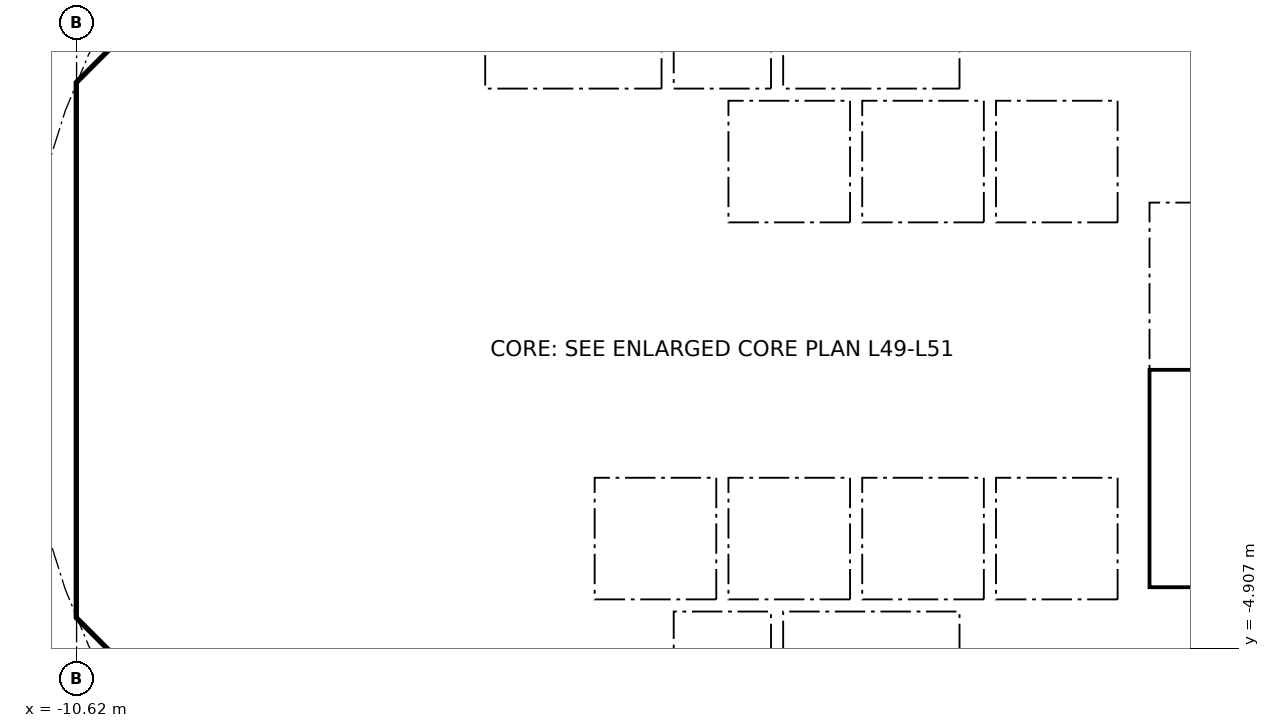
"""IFC4 building model, lengths in metres.
Left out: names, types, materials, properties, quantities, classifications, styles, units other than length and angle.
Written with IfcOpenShell. Run it as: python <this file> out.ifc"""

import sys

from ifc_helpers import new_model, si_unit, direction, frame, frame_2d, origin, place, context, subcontext, project, spatial, polyline, rectangle, outline, extrude, element, fill, save


model = new_model("IFC4")
c1 = context("Model", 3, precision=1e-05, world=origin(), true_north=direction((0.0, 1.0)))
c2 = subcontext(c1, "Body", "Model", "MODEL_VIEW")
j1 = project(units=[si_unit("LENGTHUNIT", "METRE"), si_unit("PLANEANGLEUNIT", "RADIAN")], contexts=[c1])
p1 = place(None, origin())
s1 = spatial("IfcSite", under=j1, at=p1, CompositionType="ELEMENT")
p2 = place(p1, origin())
s2 = spatial("IfcBuilding", under=s1, at=p2, CompositionType="ELEMENT")
p3 = place(p2, frame((0.0, 0.0, 195.5)))
s3 = spatial("IfcBuildingStorey", under=s2, at=p3, CompositionType="ELEMENT", Elevation=195.5)
p4 = place(p3, frame((9.988, 4.613, 0.0), z_axis=(0.0, 0.0, 1.0), x_axis=(-0.707106781187, 0.707106781187, 0.0)))
e1 = element("IfcWall", 1, at=p4, inside=s3, PredefinedType="SHEAR", context=c2, shape_type="SweptSolid", body=[
    extrude(rectangle(XDim=7.602, YDim=0.6, at=frame_2d((3.801, 0.0))), origin(), (0.0, 0.0, 1.0), 3.44),
])
p5 = place(p4, frame((3.201, 0.0, 0.0)))
e2 = element("IfcOpeningElement", 2, at=p5, cuts=e1, PredefinedType="OPENING", context=c2, shape_type="SweptSolid", body=[
    extrude(rectangle(XDim=1.2, YDim=2.1, at=frame_2d((0.6, 1.05))), frame((0.0, 0.31, 0.0), z_axis=(0.0, -1.0, 0.0), x_axis=(1.0, 0.0, 0.0)), (0.0, 0.0, 1.0), 0.62),
])
p6 = place(p3, frame((-4.613, 9.988, 0.0), z_axis=(0.0, 0.0, 1.0), x_axis=(-0.707106781187, -0.707106781187, 0.0)))
e3 = element("IfcWall", 3, at=p6, inside=s3, PredefinedType="SHEAR", context=c2, shape_type="SweptSolid", body=[
    extrude(rectangle(XDim=7.602, YDim=0.6, at=frame_2d((3.801, 0.0))), origin(), (0.0, 0.0, 1.0), 3.44),
])
p7 = place(p6, frame((0.351, 0.0, 0.0)))
e4 = element("IfcOpeningElement", 4, at=p7, cuts=e3, PredefinedType="OPENING", context=c2, shape_type="SweptSolid", body=[
    extrude(rectangle(XDim=1.1, YDim=2.1, at=frame_2d((0.55, 1.05))), frame((0.0, 0.31, 0.0), z_axis=(0.0, -1.0, 0.0), x_axis=(1.0, 0.0, 0.0)), (0.0, 0.0, 1.0), 0.62),
])
p8 = place(p3, frame((-10.325, 3.801, 0.0), z_axis=(0.0, 0.0, 1.0), x_axis=(0.0, -1.0, 0.0)))
e5 = element("IfcWall", 5, at=p8, inside=s3, PredefinedType="SHEAR", context=c2, shape_type="SweptSolid", body=[
    extrude(rectangle(XDim=7.602, YDim=0.6, at=frame_2d((3.801, 0.0))), origin(), (0.0, 0.0, 1.0), 3.44),
])
p9 = place(p8, frame((0.651, 0.0, 0.0)))
e6 = element("IfcOpeningElement", 6, at=p9, cuts=e5, PredefinedType="OPENING", context=c2, shape_type="SweptSolid", body=[
    extrude(rectangle(XDim=1.5, YDim=2.1, at=frame_2d((0.75, 1.05))), frame((0.0, 0.31, 0.0), z_axis=(0.0, -1.0, 0.0), x_axis=(1.0, 0.0, 0.0)), (0.0, 0.0, 1.0), 0.62),
])
p10 = place(p8, frame((5.451, 0.0, 0.0)))
e7 = element("IfcOpeningElement", 7, at=p10, cuts=e5, PredefinedType="OPENING", context=c2, shape_type="SweptSolid", body=[
    extrude(rectangle(XDim=1.5, YDim=2.1, at=frame_2d((0.75, 1.05))), frame((0.0, 0.31, 0.0), z_axis=(0.0, -1.0, 0.0), x_axis=(1.0, 0.0, 0.0)), (0.0, 0.0, 1.0), 0.62),
])
p11 = place(p3, frame((-9.988, -4.613, 0.0), z_axis=(0.0, 0.0, 1.0), x_axis=(0.707106781187, -0.707106781187, 0.0)))
e8 = element("IfcWall", 8, at=p11, inside=s3, PredefinedType="SHEAR", context=c2, shape_type="SweptSolid", body=[
    extrude(rectangle(XDim=7.602, YDim=0.6, at=frame_2d((3.801, 0.0))), origin(), (0.0, 0.0, 1.0), 3.44),
])
p12 = place(p11, frame((6.151, 0.0, 0.0)))
e9 = element("IfcOpeningElement", 9, at=p12, cuts=e8, PredefinedType="OPENING", context=c2, shape_type="SweptSolid", body=[
    extrude(rectangle(XDim=1.1, YDim=2.1, at=frame_2d((0.55, 1.05))), frame((0.0, 0.31, 0.0), z_axis=(0.0, -1.0, 0.0), x_axis=(1.0, 0.0, 0.0)), (0.0, 0.0, 1.0), 0.62),
])
p13 = place(p3, frame((4.613, -9.988, 0.0), z_axis=(0.0, 0.0, 1.0), x_axis=(0.707106781187, 0.707106781187, 0.0)))
e10 = element("IfcWall", 10, at=p13, inside=s3, PredefinedType="SHEAR", context=c2, shape_type="SweptSolid", body=[
    extrude(rectangle(XDim=7.602, YDim=0.6, at=frame_2d((3.801, 0.0))), origin(), (0.0, 0.0, 1.0), 3.44),
])
p14 = place(p13, frame((3.201, 0.0, 0.0)))
e11 = element("IfcOpeningElement", 11, at=p14, cuts=e10, PredefinedType="OPENING", context=c2, shape_type="SweptSolid", body=[
    extrude(rectangle(XDim=1.2, YDim=2.1, at=frame_2d((0.6, 1.05))), frame((0.0, 0.31, 0.0), z_axis=(0.0, -1.0, 0.0), x_axis=(1.0, 0.0, 0.0)), (0.0, 0.0, 1.0), 0.62),
])
p15 = place(p3, frame((-5.8, 4.3, 0.0), z_axis=(0.0, 0.0, 1.0), x_axis=(0.0, 1.0, 0.0)))
e12 = element("IfcWall", 12, at=p15, inside=s3, PredefinedType="PARTITIONING", context=c2, shape_type="SweptSolid", body=[
    extrude(rectangle(XDim=3.927, YDim=0.15, at=frame_2d((1.963, 0.0))), origin(), (0.0, 0.0, 1.0), 3.44),
])
p16 = place(p15, frame((1.551, 0.0, 0.0)))
e13 = element("IfcOpeningElement", 13, at=p16, cuts=e12, PredefinedType="OPENING", context=c2, shape_type="SweptSolid", body=[
    extrude(rectangle(XDim=0.9, YDim=2.1, at=frame_2d((0.45, 1.05))), frame((0.0, 0.085, 0.0), z_axis=(0.0, -1.0, 0.0), x_axis=(1.0, 0.0, 0.0)), (0.0, 0.0, 1.0), 0.17),
])
p17 = place(p3, frame((4.0, 4.3, 0.0), z_axis=(0.0, 0.0, 1.0), x_axis=(0.0, 1.0, 0.0)))
e14 = element("IfcWall", 14, at=p17, inside=s3, PredefinedType="SOLIDWALL", context=c2, shape_type="SweptSolid", body=[
    extrude(rectangle(XDim=2.2, YDim=0.2, at=frame_2d((1.1, 0.0))), origin(), (0.0, 0.0, 1.0), 3.44),
])
p18 = place(p17, frame((0.55, 0.0, 0.0)))
e15 = element("IfcOpeningElement", 15, at=p18, cuts=e14, PredefinedType="OPENING", context=c2, shape_type="SweptSolid", body=[
    extrude(rectangle(XDim=1.1, YDim=2.1, at=frame_2d((0.55, 1.05))), frame((0.0, 0.11, 0.0), z_axis=(0.0, -1.0, 0.0), x_axis=(1.0, 0.0, 0.0)), (0.0, 0.0, 1.0), 0.22),
])
p19 = place(p3, frame((-4.0, 4.3, 0.0), z_axis=(0.0, 0.0, 1.0), x_axis=(0.0, 1.0, 0.0)))
e16 = element("IfcWall", 16, at=p19, inside=s3, PredefinedType="SOLIDWALL", context=c2, shape_type="SweptSolid", body=[
    extrude(rectangle(XDim=2.2, YDim=0.2, at=frame_2d((1.1, 0.0))), origin(), (0.0, 0.0, 1.0), 3.44),
])
p20 = place(p19, frame((0.55, 0.0, 0.0)))
e17 = element("IfcOpeningElement", 17, at=p20, cuts=e16, PredefinedType="OPENING", context=c2, shape_type="SweptSolid", body=[
    extrude(rectangle(XDim=1.1, YDim=2.1, at=frame_2d((0.55, 1.05))), frame((0.0, 0.11, 0.0), z_axis=(0.0, -1.0, 0.0), x_axis=(1.0, 0.0, 0.0)), (0.0, 0.0, 1.0), 0.22),
])
p21 = place(p3, frame((-6.7, 2.0, 0.0), z_axis=(0.0, 0.0, 1.0), x_axis=(1.0, 0.0, 0.0)))
e18 = element("IfcWall", 18, at=p21, inside=s3, PredefinedType="SOLIDWALL", context=c2, shape_type="SweptSolid", body=[
    extrude(rectangle(XDim=13.4, YDim=0.2, at=frame_2d((6.7, 0.0))), origin(), (0.0, 0.0, 1.0), 3.44),
])
p22 = place(p21, frame((7.25, 0.0, 0.0)))
e19 = element("IfcOpeningElement", 19, at=p22, cuts=e18, PredefinedType="OPENING", context=c2, shape_type="SweptSolid", body=[
    extrude(rectangle(XDim=1.1, YDim=2.1, at=frame_2d((0.55, 1.05))), frame((0.0, 0.11, 0.0), z_axis=(0.0, -1.0, 0.0), x_axis=(1.0, 0.0, 0.0)), (0.0, 0.0, 1.0), 0.22),
])
p23 = place(p21, frame((9.45, 0.0, 0.0)))
e20 = element("IfcOpeningElement", 20, at=p23, cuts=e18, PredefinedType="OPENING", context=c2, shape_type="SweptSolid", body=[
    extrude(rectangle(XDim=1.1, YDim=2.1, at=frame_2d((0.55, 1.05))), frame((0.0, 0.11, 0.0), z_axis=(0.0, -1.0, 0.0), x_axis=(1.0, 0.0, 0.0)), (0.0, 0.0, 1.0), 0.22),
])
p24 = place(p21, frame((2.95, 0.0, 0.0)))
e21 = element("IfcOpeningElement", 21, at=p24, cuts=e18, PredefinedType="OPENING", context=c2, shape_type="SweptSolid", body=[
    extrude(rectangle(XDim=0.9, YDim=2.1, at=frame_2d((0.45, 1.05))), frame((0.0, 0.11, 0.0), z_axis=(0.0, -1.0, 0.0), x_axis=(1.0, 0.0, 0.0)), (0.0, 0.0, 1.0), 0.22),
])
p25 = place(p3, frame((6.7, 4.0, 0.0), z_axis=(0.0, 0.0, 1.0), x_axis=(1.0, 0.0, 0.0)))
e22 = element("IfcWall", 22, at=p25, inside=s3, PredefinedType="SOLIDWALL", context=c2, shape_type="SweptSolid", body=[
    extrude(rectangle(XDim=3.325, YDim=0.2, at=frame_2d((1.662, 0.0))), origin(), (0.0, 0.0, 1.0), 3.44),
])
p26 = place(p25, frame((1.25, 0.0, 0.0)))
e23 = element("IfcOpeningElement", 23, at=p26, cuts=e22, PredefinedType="OPENING", context=c2, shape_type="SweptSolid", body=[
    extrude(rectangle(XDim=1.1, YDim=2.1, at=frame_2d((0.55, 1.05))), frame((0.0, 0.11, 0.0), z_axis=(0.0, -1.0, 0.0), x_axis=(1.0, 0.0, 0.0)), (0.0, 0.0, 1.0), 0.22),
])
p27 = place(p3, frame((-6.2, -7.827, 0.0), z_axis=(0.0, 0.0, 1.0), x_axis=(0.0, 1.0, 0.0)))
e24 = element("IfcWall", 24, at=p27, inside=s3, PredefinedType="PARTITIONING", context=c2, shape_type="SweptSolid", body=[
    extrude(rectangle(XDim=3.527, YDim=0.15, at=frame_2d((1.763, 0.0))), origin(), (0.0, 0.0, 1.0), 3.44),
])
p28 = place(p27, frame((2.365, 0.0, 0.0)))
e25 = element("IfcOpeningElement", 25, at=p28, cuts=e24, PredefinedType="OPENING", context=c2, shape_type="SweptSolid", body=[
    extrude(rectangle(XDim=0.9, YDim=2.1, at=frame_2d((0.45, 1.05))), frame((0.0, 0.085, 0.0), z_axis=(0.0, -1.0, 0.0), x_axis=(1.0, 0.0, 0.0)), (0.0, 0.0, 1.0), 0.17),
])
p29 = place(p27, frame((0.489, 0.0, 0.0)))
e26 = element("IfcOpeningElement", 26, at=p29, cuts=e24, PredefinedType="OPENING", context=c2, shape_type="SweptSolid", body=[
    extrude(rectangle(XDim=0.9, YDim=2.1, at=frame_2d((0.45, 1.05))), frame((0.0, 0.085, 0.0), z_axis=(0.0, -1.0, 0.0), x_axis=(1.0, 0.0, 0.0)), (0.0, 0.0, 1.0), 0.17),
])
p30 = place(p3, frame((4.0, -6.5, 0.0), z_axis=(0.0, 0.0, 1.0), x_axis=(0.0, 1.0, 0.0)))
e27 = element("IfcWall", 27, at=p30, inside=s3, PredefinedType="SOLIDWALL", context=c2, shape_type="SweptSolid", body=[
    extrude(rectangle(XDim=2.2, YDim=0.2, at=frame_2d((1.1, 0.0))), origin(), (0.0, 0.0, 1.0), 3.44),
])
p31 = place(p30, frame((0.55, 0.0, 0.0)))
e28 = element("IfcOpeningElement", 28, at=p31, cuts=e27, PredefinedType="OPENING", context=c2, shape_type="SweptSolid", body=[
    extrude(rectangle(XDim=1.1, YDim=2.1, at=frame_2d((0.55, 1.05))), frame((0.0, 0.11, 0.0), z_axis=(0.0, -1.0, 0.0), x_axis=(1.0, 0.0, 0.0)), (0.0, 0.0, 1.0), 0.22),
])
p32 = place(p3, frame((-4.0, -6.5, 0.0), z_axis=(0.0, 0.0, 1.0), x_axis=(0.0, 1.0, 0.0)))
e29 = element("IfcWall", 29, at=p32, inside=s3, PredefinedType="SOLIDWALL", context=c2, shape_type="SweptSolid", body=[
    extrude(rectangle(XDim=2.2, YDim=0.2, at=frame_2d((1.1, 0.0))), origin(), (0.0, 0.0, 1.0), 3.44),
])
p33 = place(p32, frame((0.65, 0.0, 0.0)))
e30 = element("IfcOpeningElement", 30, at=p33, cuts=e29, PredefinedType="OPENING", context=c2, shape_type="SweptSolid", body=[
    extrude(rectangle(XDim=0.9, YDim=2.1, at=frame_2d((0.45, 1.05))), frame((0.0, 0.11, 0.0), z_axis=(0.0, -1.0, 0.0), x_axis=(1.0, 0.0, 0.0)), (0.0, 0.0, 1.0), 0.22),
])
p34 = place(p3, frame((-6.7, -2.0, 0.0), z_axis=(0.0, 0.0, 1.0), x_axis=(1.0, 0.0, 0.0)))
e31 = element("IfcWall", 31, at=p34, inside=s3, PredefinedType="SOLIDWALL", context=c2, shape_type="SweptSolid", body=[
    extrude(rectangle(XDim=13.4, YDim=0.2, at=frame_2d((6.7, 0.0))), origin(), (0.0, 0.0, 1.0), 3.44),
])
p35 = place(p34, frame((5.05, 0.0, 0.0)))
e32 = element("IfcOpeningElement", 32, at=p35, cuts=e31, PredefinedType="OPENING", context=c2, shape_type="SweptSolid", body=[
    extrude(rectangle(XDim=1.1, YDim=2.1, at=frame_2d((0.55, 1.05))), frame((0.0, 0.11, 0.0), z_axis=(0.0, -1.0, 0.0), x_axis=(1.0, 0.0, 0.0)), (0.0, 0.0, 1.0), 0.22),
])
p36 = place(p34, frame((7.25, 0.0, 0.0)))
e33 = element("IfcOpeningElement", 33, at=p36, cuts=e31, PredefinedType="OPENING", context=c2, shape_type="SweptSolid", body=[
    extrude(rectangle(XDim=1.1, YDim=2.1, at=frame_2d((0.55, 1.05))), frame((0.0, 0.11, 0.0), z_axis=(0.0, -1.0, 0.0), x_axis=(1.0, 0.0, 0.0)), (0.0, 0.0, 1.0), 0.22),
])
p37 = place(p34, frame((0.75, 0.0, 0.0)))
e34 = element("IfcOpeningElement", 34, at=p37, cuts=e31, PredefinedType="OPENING", context=c2, shape_type="SweptSolid", body=[
    extrude(rectangle(XDim=0.9, YDim=2.1, at=frame_2d((0.45, 1.05))), frame((0.0, 0.11, 0.0), z_axis=(0.0, -1.0, 0.0), x_axis=(1.0, 0.0, 0.0)), (0.0, 0.0, 1.0), 0.22),
])
p38 = place(p34, frame((2.95, 0.0, 0.0)))
e35 = element("IfcOpeningElement", 35, at=p38, cuts=e31, PredefinedType="OPENING", context=c2, shape_type="SweptSolid", body=[
    extrude(rectangle(XDim=0.9, YDim=2.1, at=frame_2d((0.45, 1.05))), frame((0.0, 0.11, 0.0), z_axis=(0.0, -1.0, 0.0), x_axis=(1.0, 0.0, 0.0)), (0.0, 0.0, 1.0), 0.22),
])
p39 = place(p3, origin())
e36 = element("IfcWall", 36, at=p39, inside=s3, PredefinedType="SHEAR", context=c2, shape_type="SweptSolid", body=[
    extrude(outline(polyline([(-10.625, -3.801), (-10.025, -3.801), (-10.025, -4.152), (-9.776, -4.401), (-10.2, -4.825), (-10.625, -4.401), (-10.625, -3.801)])), origin(), (0.0, 0.0, 1.0), 3.44),
])
p40 = place(p3, origin())
e37 = element("IfcWall", 37, at=p40, inside=s3, PredefinedType="SHEAR", context=c2, shape_type="SweptSolid", body=[
    extrude(outline(polyline([(-10.2, 4.825), (-9.776, 4.401), (-10.025, 4.152), (-10.025, 3.801), (-10.625, 3.801), (-10.625, 4.401), (-10.2, 4.825)])), origin(), (0.0, 0.0, 1.0), 3.44),
])
for number, where, z_axis, x_axis in (
    (38, (-0.9, -6.5, 0.0), (0.0, 0.0, 1.0), (0.0, 1.0, 0.0)),
    (39, (0.9, -6.5, 0.0), (0.0, 0.0, 1.0), (0.0, 1.0, 0.0)),
):
    element("IfcWall", number, at=place(p3, frame(where, z_axis=z_axis, x_axis=x_axis)), inside=s3, PredefinedType="SOLIDWALL", context=c2, shape_type="SweptSolid", body=[
        extrude(rectangle(XDim=2.2, YDim=0.2, at=frame_2d((1.1, 0.0))), origin(), (0.0, 0.0, 1.0), 3.44),
    ])
p41 = place(p3, origin())
e40 = element("IfcWall", 40, at=p41, inside=s3, PredefinedType="SOLIDWALL", context=c2, shape_type="SweptSolid", body=[
    extrude(outline(polyline([(-6.7, -2.1), (-6.5, -2.1), (-6.5, -4.1), (-4.5, -4.1), (-4.5, -2.1), (-4.3, -2.1), (-4.3, -4.1), (-2.3, -4.1), (-2.3, -2.1), (-2.1, -2.1), (-2.1, -4.1), (-0.1, -4.1), (-0.1, -2.1), (0.1, -2.1), (0.1, -4.1), (2.1, -4.1), (2.1, -2.1), (2.3, -2.1), (2.3, -4.1), (4.3, -4.1), (4.3, -2.1), (4.5, -2.1), (4.5, -4.1), (6.5, -4.1), (6.5, -2.1), (6.7, -2.1), (6.7, -4.3), (-6.7, -4.3), (-6.7, -2.1)])), origin(), (0.0, 0.0, 1.0), 3.44),
])
for number, where, z_axis, x_axis in (
    (41, (-0.9, 4.3, 0.0), (0.0, 0.0, 1.0), (0.0, 1.0, 0.0)),
    (42, (0.9, 4.3, 0.0), (0.0, 0.0, 1.0), (0.0, 1.0, 0.0)),
):
    element("IfcWall", number, at=place(p3, frame(where, z_axis=z_axis, x_axis=x_axis)), inside=s3, PredefinedType="SOLIDWALL", context=c2, shape_type="SweptSolid", body=[
        extrude(rectangle(XDim=2.2, YDim=0.2, at=frame_2d((1.1, 0.0))), origin(), (0.0, 0.0, 1.0), 3.44),
    ])
p42 = place(p3, origin())
e43 = element("IfcWall", 43, at=p42, inside=s3, PredefinedType="SOLIDWALL", context=c2, shape_type="SweptSolid", body=[
    extrude(outline(polyline([(-6.7, 4.3), (6.7, 4.3), (6.7, 2.1), (6.5, 2.1), (6.5, 4.1), (4.5, 4.1), (4.5, 2.1), (4.3, 2.1), (4.3, 4.1), (2.3, 4.1), (2.3, 2.1), (2.1, 2.1), (2.1, 4.1), (0.1, 4.1), (0.1, 2.1), (-0.1, 2.1), (-0.1, 4.1), (-6.5, 4.1), (-6.5, 2.1), (-6.7, 2.1), (-6.7, 4.3)])), origin(), (0.0, 0.0, 1.0), 3.44),
])
for number, where, z_axis, x_axis in (
    (44, (-10.025, -4.0, 0.0), (0.0, 0.0, 1.0), (1.0, 0.0, 0.0)),
    (45, (-10.025, 4.0, 0.0), (0.0, 0.0, 1.0), (1.0, 0.0, 0.0)),
):
    element("IfcWall", number, at=place(p3, frame(where, z_axis=z_axis, x_axis=x_axis)), inside=s3, PredefinedType="PARTITIONING", context=c2, shape_type="SweptSolid", body=[
        extrude(rectangle(XDim=3.325, YDim=0.2, at=frame_2d((1.662, 0.0))), origin(), (0.0, 0.0, 1.0), 3.44),
    ])
p43 = place(p3, origin())
e46 = element("IfcWall", 46, at=p43, inside=s3, PredefinedType="SOLIDWALL", context=c2, shape_type="SweptSolid", body=[
    extrude(outline(polyline([(7.025, -3.9), (6.7, -3.9), (6.7, 3.9), (7.025, 3.9), (7.025, -3.9)])), origin(), (0.0, 0.0, 1.0), 3.44),
])
p44 = place(p3, origin())
e47 = element("IfcWall", 47, at=p44, inside=s3, PredefinedType="SOLIDWALL", context=c2, shape_type="SweptSolid", body=[
    extrude(outline(polyline([(10.025, -4.1), (6.7, -4.1), (6.7, -3.9), (10.025, -3.9), (10.025, -4.1)])), origin(), (0.0, 0.0, 1.0), 3.44),
])
p45 = place(p22, origin())
e48 = element("IfcDoor", 48, at=p45, inside=s3, OperationType="DOUBLE_DOOR_SLIDING", PredefinedType="DOOR", context=c2, shape_type="SweptSolid", body=[
    extrude(rectangle(XDim=1.1, YDim=2.1, at=frame_2d((0.55, 1.05))), frame((0.0, 0.025, 0.0), z_axis=(0.0, -1.0, 0.0), x_axis=(1.0, 0.0, 0.0)), (0.0, 0.0, 1.0), 0.05),
])
fill(e19, e48)
p46 = place(p23, origin())
e49 = element("IfcDoor", 49, at=p46, inside=s3, OperationType="DOUBLE_DOOR_SLIDING", PredefinedType="DOOR", context=c2, shape_type="SweptSolid", body=[
    extrude(rectangle(XDim=1.1, YDim=2.1, at=frame_2d((0.55, 1.05))), frame((0.0, 0.025, 0.0), z_axis=(0.0, -1.0, 0.0), x_axis=(1.0, 0.0, 0.0)), (0.0, 0.0, 1.0), 0.05),
])
fill(e20, e49)
p47 = place(p35, origin())
e50 = element("IfcDoor", 50, at=p47, inside=s3, OperationType="DOUBLE_DOOR_SLIDING", PredefinedType="DOOR", context=c2, shape_type="SweptSolid", body=[
    extrude(rectangle(XDim=1.1, YDim=2.1, at=frame_2d((0.55, 1.05))), frame((0.0, 0.025, 0.0), z_axis=(0.0, -1.0, 0.0), x_axis=(1.0, 0.0, 0.0)), (0.0, 0.0, 1.0), 0.05),
])
fill(e32, e50)
p48 = place(p36, origin())
e51 = element("IfcDoor", 51, at=p48, inside=s3, OperationType="DOUBLE_DOOR_SLIDING", PredefinedType="DOOR", context=c2, shape_type="SweptSolid", body=[
    extrude(rectangle(XDim=1.1, YDim=2.1, at=frame_2d((0.55, 1.05))), frame((0.0, 0.025, 0.0), z_axis=(0.0, -1.0, 0.0), x_axis=(1.0, 0.0, 0.0)), (0.0, 0.0, 1.0), 0.05),
])
fill(e33, e51)
p49 = place(p18, origin())
e52 = element("IfcDoor", 52, at=p49, inside=s3, OperationType="DOUBLE_DOOR_SLIDING", PredefinedType="DOOR", context=c2, shape_type="SweptSolid", body=[
    extrude(rectangle(XDim=1.1, YDim=2.1, at=frame_2d((0.55, 1.05))), frame((0.0, 0.025, 0.0), z_axis=(0.0, -1.0, 0.0), x_axis=(1.0, 0.0, 0.0)), (0.0, 0.0, 1.0), 0.05),
])
fill(e15, e52)
p50 = place(p31, origin())
e53 = element("IfcDoor", 53, at=p50, inside=s3, OperationType="DOUBLE_DOOR_SLIDING", PredefinedType="DOOR", context=c2, shape_type="SweptSolid", body=[
    extrude(rectangle(XDim=1.1, YDim=2.1, at=frame_2d((0.55, 1.05))), frame((0.0, 0.025, 0.0), z_axis=(0.0, -1.0, 0.0), x_axis=(1.0, 0.0, 0.0)), (0.0, 0.0, 1.0), 0.05),
])
fill(e28, e53)
p51 = place(p20, origin())
e54 = element("IfcDoor", 54, at=p51, inside=s3, OperationType="DOUBLE_DOOR_SLIDING", PredefinedType="DOOR", context=c2, shape_type="SweptSolid", body=[
    extrude(rectangle(XDim=1.1, YDim=2.1, at=frame_2d((0.55, 1.05))), frame((0.0, 0.025, 0.0), z_axis=(0.0, -1.0, 0.0), x_axis=(1.0, 0.0, 0.0)), (0.0, 0.0, 1.0), 0.05),
])
fill(e17, e54)
p52 = place(p28, origin())
e55 = element("IfcDoor", 55, at=p52, inside=s3, OperationType="SINGLE_SWING_LEFT", PredefinedType="DOOR", context=c2, shape_type="SweptSolid", body=[
    extrude(rectangle(XDim=0.9, YDim=2.1, at=frame_2d((0.45, 1.05))), frame((0.0, 0.025, 0.0), z_axis=(0.0, -1.0, 0.0), x_axis=(1.0, 0.0, 0.0)), (0.0, 0.0, 1.0), 0.05),
])
fill(e25, e55)
p53 = place(p24, origin())
e56 = element("IfcDoor", 56, at=p53, inside=s3, OperationType="SINGLE_SWING_RIGHT", PredefinedType="DOOR", context=c2, shape_type="SweptSolid", body=[
    extrude(rectangle(XDim=0.9, YDim=2.1, at=frame_2d((0.45, 1.05))), frame((0.0, 0.025, 0.0), z_axis=(0.0, -1.0, 0.0), x_axis=(1.0, 0.0, 0.0)), (0.0, 0.0, 1.0), 0.05),
])
fill(e21, e56)
p54 = place(p37, frame((0.9, 0.0, 0.0), x_axis=(-1.0, 0.0, 0.0)))
e57 = element("IfcDoor", 57, at=p54, inside=s3, OperationType="SINGLE_SWING_LEFT", PredefinedType="DOOR", context=c2, shape_type="SweptSolid", body=[
    extrude(rectangle(XDim=0.9, YDim=2.1, at=frame_2d((0.45, 1.05))), frame((0.0, 0.025, 0.0), z_axis=(0.0, -1.0, 0.0), x_axis=(1.0, 0.0, 0.0)), (0.0, 0.0, 1.0), 0.05),
])
fill(e34, e57)
p55 = place(p38, frame((0.9, 0.0, 0.0), x_axis=(-1.0, 0.0, 0.0)))
e58 = element("IfcDoor", 58, at=p55, inside=s3, OperationType="SINGLE_SWING_LEFT", PredefinedType="DOOR", context=c2, shape_type="SweptSolid", body=[
    extrude(rectangle(XDim=0.9, YDim=2.1, at=frame_2d((0.45, 1.05))), frame((0.0, 0.025, 0.0), z_axis=(0.0, -1.0, 0.0), x_axis=(1.0, 0.0, 0.0)), (0.0, 0.0, 1.0), 0.05),
])
fill(e35, e58)
p56 = place(p9, origin())
e59 = element("IfcDoor", 59, at=p56, inside=s3, OperationType="DOUBLE_DOOR_SINGLE_SWING", PredefinedType="DOOR", context=c2, shape_type="SweptSolid", body=[
    extrude(rectangle(XDim=1.5, YDim=2.1, at=frame_2d((0.75, 1.05))), frame((0.0, 0.025, 0.0), z_axis=(0.0, -1.0, 0.0), x_axis=(1.0, 0.0, 0.0)), (0.0, 0.0, 1.0), 0.05),
])
fill(e6, e59)
p57 = place(p10, origin())
e60 = element("IfcDoor", 60, at=p57, inside=s3, OperationType="DOUBLE_DOOR_SINGLE_SWING", PredefinedType="DOOR", context=c2, shape_type="SweptSolid", body=[
    extrude(rectangle(XDim=1.5, YDim=2.1, at=frame_2d((0.75, 1.05))), frame((0.0, 0.025, 0.0), z_axis=(0.0, -1.0, 0.0), x_axis=(1.0, 0.0, 0.0)), (0.0, 0.0, 1.0), 0.05),
])
fill(e7, e60)
save(model, sys.argv[1])
